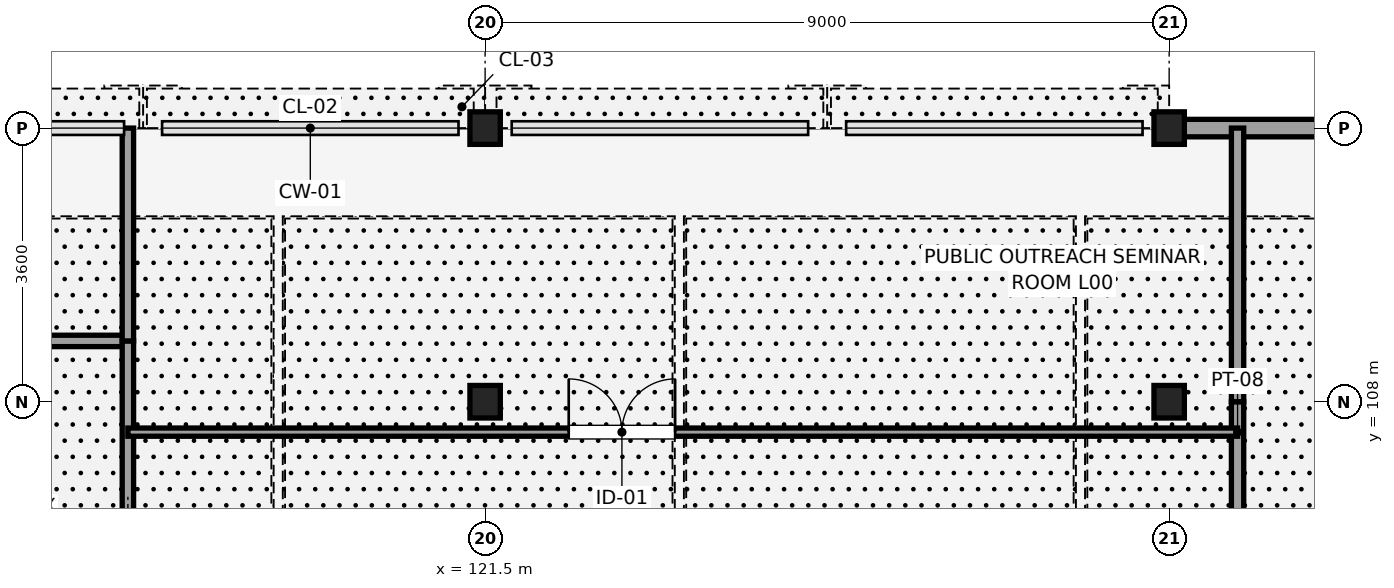
"""IFC4 building model, lengths in metres.
Left out: names, types, materials, properties, quantities, classifications, styles, units other than length and angle.
Written with IfcOpenShell. Run it as: python <this file> out.ifc"""

import sys

from ifc_helpers import new_model, si_unit, direction, frame, frame_2d, origin, origin_2d, place, context, subcontext, project, spatial, rectangle, i_section, extrude, element, fill, save


model = new_model("IFC4")
c1 = context("Model", 3, precision=1e-05, world=origin(), true_north=direction((0.0, 1.0)))
c2 = subcontext(c1, "Body", "Model", "MODEL_VIEW")
j1 = project(units=[si_unit("LENGTHUNIT", "METRE"), si_unit("PLANEANGLEUNIT", "RADIAN")], contexts=[c1])
p1 = place(None, origin())
s1 = spatial("IfcSite", under=j1, at=p1, CompositionType="ELEMENT")
p2 = place(p1, origin())
s2 = spatial("IfcBuilding", under=s1, at=p2, CompositionType="ELEMENT")
p3 = place(p2, origin())
s3 = spatial("IfcBuildingStorey", under=s2, at=p3, CompositionType="ELEMENT", Elevation=0.0)
for number, where, z_axis, x_axis in (
    (1, (121.5, 108.0, 0.0), (0.0, 0.0, 1.0), (1.0, 0.0, 0.0)),
    (2, (121.5, 111.6, 0.0), (0.0, 0.0, 1.0), (1.0, 0.0, 0.0)),
    (3, (130.5, 108.0, 0.0), (0.0, 0.0, 1.0), (1.0, 0.0, 0.0)),
    (4, (130.5, 111.6, 0.0), (0.0, 0.0, 1.0), (1.0, 0.0, 0.0)),
):
    element("IfcColumn", number, at=place(p3, frame(where, z_axis=z_axis, x_axis=x_axis)), inside=s3, PredefinedType="COLUMN", context=c2, shape_type="SweptSolid", body=[
        extrude(i_section(OverallWidth=0.4, OverallDepth=0.428, WebThickness=0.02, FlangeThickness=0.028, FilletRadius=0.016, at=origin_2d()), origin(), (0.0, 0.0, 1.0), 5.4),
    ])
p4 = place(p3, frame((139.5, 111.6, 0.0), z_axis=(0.0, 0.0, 1.0), x_axis=(-1.0, 0.0, 0.0)))
e5 = element("IfcWall", 5, at=p4, inside=s3, PredefinedType="STANDARD", context=c2, shape_type="SweptSolid", body=[
    extrude(rectangle(XDim=9.0, YDim=0.23, at=frame_2d((4.5, 0.0))), origin(), (0.0, 0.0, 1.0), 5.22),
])
p5 = place(p4, frame((3.5, 0.0, 0.0)))
e6 = element("IfcOpeningElement", 6, at=p5, cuts=e5, PredefinedType="OPENING", context=c2, shape_type="SweptSolid", body=[
    extrude(rectangle(XDim=1.85, YDim=2.2, at=frame_2d((0.925, 1.1))), frame((0.0, 0.125, 0.0), z_axis=(0.0, -1.0, 0.0), x_axis=(1.0, 0.0, 0.0)), (0.0, 0.0, 1.0), 0.25),
])
p6 = place(p3, frame((131.4, 96.6, 0.0), z_axis=(0.0, 0.0, 1.0), x_axis=(0.0, 1.0, 0.0)))
e7 = element("IfcWall", 7, at=p6, inside=s3, PredefinedType="PARTITIONING", context=c2, shape_type="SweptSolid", body=[
    extrude(rectangle(XDim=11.4, YDim=0.162, at=frame_2d((5.7, 0.0))), origin(), (0.0, 0.0, 1.0), 5.22),
])
p7 = place(p6, frame((3.8, 0.0, 0.0)))
e8 = element("IfcOpeningElement", 8, at=p7, cuts=e7, PredefinedType="OPENING", context=c2, shape_type="SweptSolid", body=[
    extrude(rectangle(XDim=1.51, YDim=2.15, at=frame_2d((0.755, 1.075))), frame((0.0, 0.091, 0.0), z_axis=(0.0, -1.0, 0.0), x_axis=(1.0, 0.0, 0.0)), (0.0, 0.0, 1.0), 0.182),
])
p8 = place(p3, frame((131.4, 108.0, 0.0), z_axis=(0.0, 0.0, 1.0), x_axis=(0.0, 1.0, 0.0)))
e9 = element("IfcWall", 9, at=p8, inside=s3, PredefinedType="PARTITIONING", context=c2, shape_type="SweptSolid", body=[
    extrude(rectangle(XDim=3.6, YDim=0.162, at=frame_2d((1.8, 0.0))), origin(), (0.0, 0.0, 1.0), 5.22),
])
p9 = place(p3, frame((112.5, 108.8, 0.0), z_axis=(0.0, 0.0, 1.0), x_axis=(1.0, 0.0, 0.0)))
e10 = element("IfcWall", 10, at=p9, inside=s3, PredefinedType="PARTITIONING", context=c2, shape_type="SweptSolid", body=[
    extrude(rectangle(XDim=4.3, YDim=0.15, at=frame_2d((2.15, 0.0))), origin(), (0.0, 0.0, 1.0), 5.22),
])
p10 = place(p3, frame((116.8, 104.4, 0.0), z_axis=(0.0, 0.0, 1.0), x_axis=(0.0, 1.0, 0.0)))
e11 = element("IfcWall", 11, at=p10, inside=s3, PredefinedType="PARTITIONING", context=c2, shape_type="SweptSolid", body=[
    extrude(rectangle(XDim=4.4, YDim=0.15, at=frame_2d((2.2, 0.0))), origin(), (0.0, 0.0, 1.0), 5.22),
])
p11 = place(p10, frame((1.1, 0.0, 0.0)))
e12 = element("IfcOpeningElement", 12, at=p11, cuts=e11, PredefinedType="OPENING", context=c2, shape_type="SweptSolid", body=[
    extrude(rectangle(XDim=1.0, YDim=2.15, at=frame_2d((0.5, 1.075))), frame((0.0, 0.085, 0.0), z_axis=(0.0, -1.0, 0.0), x_axis=(1.0, 0.0, 0.0)), (0.0, 0.0, 1.0), 0.17),
])
p12 = place(p3, frame((116.8, 108.8, 0.0), z_axis=(0.0, 0.0, 1.0), x_axis=(0.0, 1.0, 0.0)))
e13 = element("IfcWall", 13, at=p12, inside=s3, PredefinedType="PARTITIONING", context=c2, shape_type="SweptSolid", body=[
    extrude(rectangle(XDim=2.8, YDim=0.15, at=frame_2d((1.4, 0.0))), origin(), (0.0, 0.0, 1.0), 5.22),
])
p13 = place(p3, frame((116.8, 107.6, 0.0), z_axis=(0.0, 0.0, 1.0), x_axis=(1.0, 0.0, 0.0)))
e14 = element("IfcWall", 14, at=p13, inside=s3, PredefinedType="PARTITIONING", context=c2, shape_type="SweptSolid", body=[
    extrude(rectangle(XDim=14.6, YDim=0.108, at=frame_2d((7.3, 0.0))), origin(), (0.0, 0.0, 1.0), 5.22),
])
p14 = place(p13, frame((5.8, 0.0, 0.0)))
e15 = element("IfcOpeningElement", 15, at=p14, cuts=e14, PredefinedType="OPENING", context=c2, shape_type="SweptSolid", body=[
    extrude(rectangle(XDim=1.4, YDim=2.2, at=frame_2d((0.7, 1.1))), frame((0.0, 0.064, 0.0), z_axis=(0.0, -1.0, 0.0), x_axis=(1.0, 0.0, 0.0)), (0.0, 0.0, 1.0), 0.128),
])
p15 = place(p14, origin())
e16 = element("IfcDoor", 16, at=p15, inside=s3, OperationType="DOUBLE_DOOR_SINGLE_SWING", PredefinedType="DOOR", context=c2, shape_type="SweptSolid", body=[
    extrude(rectangle(XDim=1.4, YDim=2.2, at=frame_2d((0.7, 1.1))), frame((0.0, 0.025, 0.0), z_axis=(0.0, -1.0, 0.0), x_axis=(1.0, 0.0, 0.0)), (0.0, 0.0, 1.0), 0.05),
])
fill(e15, e16)
save(model, sys.argv[1])
